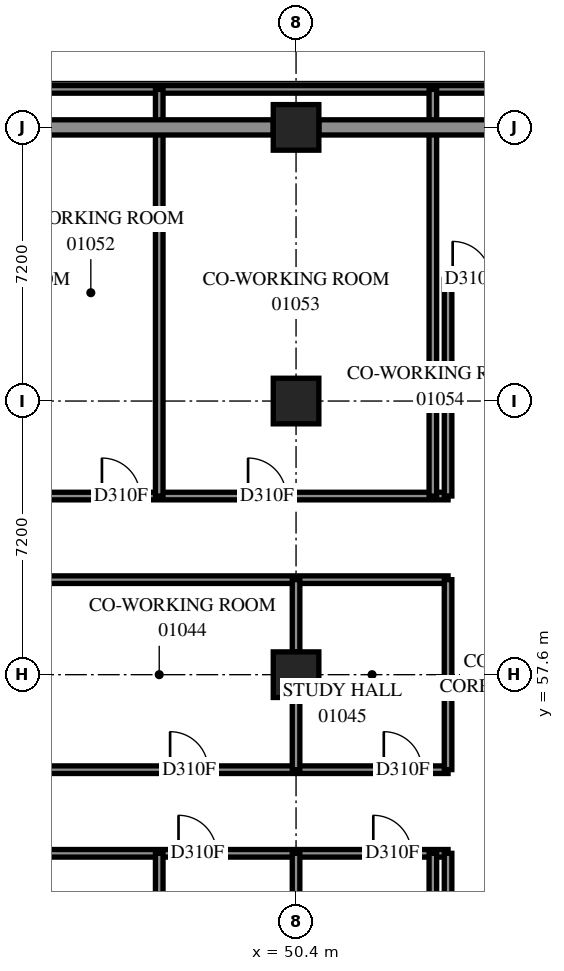
"""IFC4 building model, lengths in metres.
Left out: names, types, materials, properties, quantities, classifications, styles, units other than length and angle.
Written with IfcOpenShell. Run it as: python <this file> out.ifc"""

import sys

from ifc_helpers import new_model, si_unit, direction, frame, frame_2d, origin, origin_2d, place, context, subcontext, project, spatial, rectangle, extrude, element, fill, save


model = new_model("IFC4")
c1 = context("Model", 3, precision=1e-05, world=origin(), true_north=direction((0.0, 1.0)))
c2 = subcontext(c1, "Body", "Model", "MODEL_VIEW")
j1 = project(units=[si_unit("LENGTHUNIT", "METRE"), si_unit("PLANEANGLEUNIT", "RADIAN")], contexts=[c1])
p1 = place(None, origin())
s1 = spatial("IfcSite", under=j1, at=p1, CompositionType="ELEMENT")
p2 = place(p1, origin())
s2 = spatial("IfcBuilding", under=s1, at=p2, CompositionType="ELEMENT")
p3 = place(p2, frame((0.0, 0.0, 6.0)))
s3 = spatial("IfcBuildingStorey", under=s2, at=p3, CompositionType="ELEMENT", Elevation=6.0)
for number, where, z_axis, x_axis in (
    (1, (50.4, 57.6, 0.0), (0.0, 0.0, 1.0), (1.0, 0.0, 0.0)),
    (2, (50.4, 64.8, 0.0), (0.0, 0.0, 1.0), (1.0, 0.0, 0.0)),
    (3, (50.4, 72.0, 0.0), (0.0, 0.0, 1.0), (1.0, 0.0, 0.0)),
):
    element("IfcColumn", number, at=place(p3, frame(where, z_axis=z_axis, x_axis=x_axis)), inside=s3, PredefinedType="COLUMN", context=c2, shape_type="SweptSolid", body=[
        extrude(rectangle(XDim=1.2, YDim=1.2, at=origin_2d()), origin(), (0.0, 0.0, 1.0), 3.8),
    ])
p4 = place(p3, frame((6.0, 73.0, 0.0), z_axis=(0.0, 0.0, 1.0), x_axis=(1.0, 0.0, 0.0)))
e4 = element("IfcWall", 4, at=p4, inside=s3, PredefinedType="PARTITIONING", context=c2, shape_type="SweptSolid", body=[
    extrude(rectangle(XDim=73.2, YDim=0.2, at=frame_2d((36.6, 0.0))), origin(), (0.0, 0.0, 1.0), 3.8),
])
p5 = place(p3, frame((0.0, 55.1, 0.0), z_axis=(0.0, 0.0, 1.0), x_axis=(1.0, 0.0, 0.0)))
e5 = element("IfcWall", 5, at=p5, inside=s3, PredefinedType="PARTITIONING", context=c2, shape_type="SweptSolid", body=[
    extrude(rectangle(XDim=54.4, YDim=0.2, at=frame_2d((27.2, 0.0))), origin(), (0.0, 0.0, 1.0), 3.8),
])
p6 = place(p5, frame((10.485, 0.0, 0.0)))
e6 = element("IfcOpeningElement", 6, at=p6, cuts=e5, PredefinedType="OPENING", context=c2, shape_type="SweptSolid", body=[
    extrude(rectangle(XDim=1.0, YDim=2.1, at=frame_2d((0.5, 1.05))), frame((0.0, 0.11, 0.0), z_axis=(0.0, -1.0, 0.0), x_axis=(1.0, 0.0, 0.0)), (0.0, 0.0, 1.0), 0.22),
])
p7 = place(p5, frame((16.475, 0.0, 0.0)))
e7 = element("IfcOpeningElement", 7, at=p7, cuts=e5, PredefinedType="OPENING", context=c2, shape_type="SweptSolid", body=[
    extrude(rectangle(XDim=1.0, YDim=2.1, at=frame_2d((0.5, 1.05))), frame((0.0, 0.11, 0.0), z_axis=(0.0, -1.0, 0.0), x_axis=(1.0, 0.0, 0.0)), (0.0, 0.0, 1.0), 0.22),
])
p8 = place(p5, frame((22.025, 0.0, 0.0)))
e8 = element("IfcOpeningElement", 8, at=p8, cuts=e5, PredefinedType="OPENING", context=c2, shape_type="SweptSolid", body=[
    extrude(rectangle(XDim=1.0, YDim=2.1, at=frame_2d((0.5, 1.05))), frame((0.0, 0.11, 0.0), z_axis=(0.0, -1.0, 0.0), x_axis=(1.0, 0.0, 0.0)), (0.0, 0.0, 1.0), 0.22),
])
p9 = place(p5, frame((34.484, 0.0, 0.0)))
e9 = element("IfcOpeningElement", 9, at=p9, cuts=e5, PredefinedType="OPENING", context=c2, shape_type="SweptSolid", body=[
    extrude(rectangle(XDim=1.0, YDim=2.1, at=frame_2d((0.5, 1.05))), frame((0.0, 0.11, 0.0), z_axis=(0.0, -1.0, 0.0), x_axis=(1.0, 0.0, 0.0)), (0.0, 0.0, 1.0), 0.22),
])
p10 = place(p5, frame((40.125, 0.0, 0.0)))
e10 = element("IfcOpeningElement", 10, at=p10, cuts=e5, PredefinedType="OPENING", context=c2, shape_type="SweptSolid", body=[
    extrude(rectangle(XDim=1.0, YDim=2.1, at=frame_2d((0.5, 1.05))), frame((0.0, 0.11, 0.0), z_axis=(0.0, -1.0, 0.0), x_axis=(1.0, 0.0, 0.0)), (0.0, 0.0, 1.0), 0.22),
])
p11 = place(p5, frame((47.086, 0.0, 0.0)))
e11 = element("IfcOpeningElement", 11, at=p11, cuts=e5, PredefinedType="OPENING", context=c2, shape_type="SweptSolid", body=[
    extrude(rectangle(XDim=1.0, YDim=2.1, at=frame_2d((0.5, 1.05))), frame((0.0, 0.11, 0.0), z_axis=(0.0, -1.0, 0.0), x_axis=(1.0, 0.0, 0.0)), (0.0, 0.0, 1.0), 0.22),
])
p12 = place(p5, frame((52.709, 0.0, 0.0)))
e12 = element("IfcOpeningElement", 12, at=p12, cuts=e5, PredefinedType="OPENING", context=c2, shape_type="SweptSolid", body=[
    extrude(rectangle(XDim=1.0, YDim=2.1, at=frame_2d((0.5, 1.05))), frame((0.0, 0.11, 0.0), z_axis=(0.0, -1.0, 0.0), x_axis=(1.0, 0.0, 0.0)), (0.0, 0.0, 1.0), 0.22),
])
p13 = place(p5, frame((2.451, 0.0, 0.0)))
e13 = element("IfcOpeningElement", 13, at=p13, cuts=e5, PredefinedType="OPENING", context=c2, shape_type="SweptSolid", body=[
    extrude(rectangle(XDim=1.0, YDim=2.1, at=frame_2d((0.5, 1.05))), frame((0.0, 0.11, 0.0), z_axis=(0.0, -1.0, 0.0), x_axis=(1.0, 0.0, 0.0)), (0.0, 0.0, 1.0), 0.22),
])
p14 = place(p3, frame((0.0, 52.9, 0.0), z_axis=(0.0, 0.0, 1.0), x_axis=(1.0, 0.0, 0.0)))
e14 = element("IfcWall", 14, at=p14, inside=s3, PredefinedType="PARTITIONING", context=c2, shape_type="SweptSolid", body=[
    extrude(rectangle(XDim=54.4, YDim=0.2, at=frame_2d((27.2, 0.0))), origin(), (0.0, 0.0, 1.0), 3.8),
])
p15 = place(p14, frame((8.689, 0.0, 0.0)))
e15 = element("IfcOpeningElement", 15, at=p15, cuts=e14, PredefinedType="OPENING", context=c2, shape_type="SweptSolid", body=[
    extrude(rectangle(XDim=1.0, YDim=2.1, at=frame_2d((0.5, 1.05))), frame((0.0, 0.11, 0.0), z_axis=(0.0, -1.0, 0.0), x_axis=(1.0, 0.0, 0.0)), (0.0, 0.0, 1.0), 0.22),
])
p16 = place(p14, frame((11.325, 0.0, 0.0)))
e16 = element("IfcOpeningElement", 16, at=p16, cuts=e14, PredefinedType="OPENING", context=c2, shape_type="SweptSolid", body=[
    extrude(rectangle(XDim=1.0, YDim=2.1, at=frame_2d((0.5, 1.05))), frame((0.0, 0.11, 0.0), z_axis=(0.0, -1.0, 0.0), x_axis=(1.0, 0.0, 0.0)), (0.0, 0.0, 1.0), 0.22),
])
p17 = place(p14, frame((18.262, 0.0, 0.0)))
e17 = element("IfcOpeningElement", 17, at=p17, cuts=e14, PredefinedType="OPENING", context=c2, shape_type="SweptSolid", body=[
    extrude(rectangle(XDim=1.0, YDim=2.1, at=frame_2d((0.5, 1.05))), frame((0.0, 0.11, 0.0), z_axis=(0.0, -1.0, 0.0), x_axis=(1.0, 0.0, 0.0)), (0.0, 0.0, 1.0), 0.22),
])
p18 = place(p14, frame((23.633, 0.0, 0.0)))
e18 = element("IfcOpeningElement", 18, at=p18, cuts=e14, PredefinedType="OPENING", context=c2, shape_type="SweptSolid", body=[
    extrude(rectangle(XDim=1.0, YDim=2.1, at=frame_2d((0.5, 1.05))), frame((0.0, 0.11, 0.0), z_axis=(0.0, -1.0, 0.0), x_axis=(1.0, 0.0, 0.0)), (0.0, 0.0, 1.0), 0.22),
])
p19 = place(p14, frame((27.538, 0.0, 0.0)))
e19 = element("IfcOpeningElement", 19, at=p19, cuts=e14, PredefinedType="OPENING", context=c2, shape_type="SweptSolid", body=[
    extrude(rectangle(XDim=1.0, YDim=2.1, at=frame_2d((0.5, 1.05))), frame((0.0, 0.11, 0.0), z_axis=(0.0, -1.0, 0.0), x_axis=(1.0, 0.0, 0.0)), (0.0, 0.0, 1.0), 0.22),
])
p20 = place(p14, frame((32.907, 0.0, 0.0)))
e20 = element("IfcOpeningElement", 20, at=p20, cuts=e14, PredefinedType="OPENING", context=c2, shape_type="SweptSolid", body=[
    extrude(rectangle(XDim=1.0, YDim=2.1, at=frame_2d((0.5, 1.05))), frame((0.0, 0.11, 0.0), z_axis=(0.0, -1.0, 0.0), x_axis=(1.0, 0.0, 0.0)), (0.0, 0.0, 1.0), 0.22),
])
p21 = place(p14, frame((38.032, 0.0, 0.0)))
e21 = element("IfcOpeningElement", 21, at=p21, cuts=e14, PredefinedType="OPENING", context=c2, shape_type="SweptSolid", body=[
    extrude(rectangle(XDim=1.0, YDim=2.1, at=frame_2d((0.5, 1.05))), frame((0.0, 0.11, 0.0), z_axis=(0.0, -1.0, 0.0), x_axis=(1.0, 0.0, 0.0)), (0.0, 0.0, 1.0), 0.22),
])
p22 = place(p14, frame((41.938, 0.0, 0.0)))
e22 = element("IfcOpeningElement", 22, at=p22, cuts=e14, PredefinedType="OPENING", context=c2, shape_type="SweptSolid", body=[
    extrude(rectangle(XDim=1.0, YDim=2.1, at=frame_2d((0.5, 1.05))), frame((0.0, 0.11, 0.0), z_axis=(0.0, -1.0, 0.0), x_axis=(1.0, 0.0, 0.0)), (0.0, 0.0, 1.0), 0.22),
])
p23 = place(p14, frame((47.307, 0.0, 0.0)))
e23 = element("IfcOpeningElement", 23, at=p23, cuts=e14, PredefinedType="OPENING", context=c2, shape_type="SweptSolid", body=[
    extrude(rectangle(XDim=1.0, YDim=2.1, at=frame_2d((0.5, 1.05))), frame((0.0, 0.11, 0.0), z_axis=(0.0, -1.0, 0.0), x_axis=(1.0, 0.0, 0.0)), (0.0, 0.0, 1.0), 0.22),
])
p24 = place(p14, frame((52.432, 0.0, 0.0)))
e24 = element("IfcOpeningElement", 24, at=p24, cuts=e14, PredefinedType="OPENING", context=c2, shape_type="SweptSolid", body=[
    extrude(rectangle(XDim=1.0, YDim=2.1, at=frame_2d((0.5, 1.05))), frame((0.0, 0.11, 0.0), z_axis=(0.0, -1.0, 0.0), x_axis=(1.0, 0.0, 0.0)), (0.0, 0.0, 1.0), 0.22),
])
p25 = place(p14, frame((2.288, 0.0, 0.0)))
e25 = element("IfcOpeningElement", 25, at=p25, cuts=e14, PredefinedType="OPENING", context=c2, shape_type="SweptSolid", body=[
    extrude(rectangle(XDim=1.0, YDim=2.1, at=frame_2d((0.5, 1.05))), frame((0.0, 0.11, 0.0), z_axis=(0.0, -1.0, 0.0), x_axis=(1.0, 0.0, 0.0)), (0.0, 0.0, 1.0), 0.22),
])
p26 = place(p14, frame((4.772, 0.0, 0.0)))
e26 = element("IfcOpeningElement", 26, at=p26, cuts=e14, PredefinedType="OPENING", context=c2, shape_type="SweptSolid", body=[
    extrude(rectangle(XDim=1.0, YDim=2.1, at=frame_2d((0.5, 1.05))), frame((0.0, 0.11, 0.0), z_axis=(0.0, -1.0, 0.0), x_axis=(1.0, 0.0, 0.0)), (0.0, 0.0, 1.0), 0.22),
])
p27 = place(p3, frame((0.002, 60.1, 0.0), z_axis=(0.0, 0.0, 1.0), x_axis=(1.0, 0.0, 0.0)))
e27 = element("IfcWall", 27, at=p27, inside=s3, PredefinedType="PARTITIONING", context=c2, shape_type="SweptSolid", body=[
    extrude(rectangle(XDim=54.398, YDim=0.2, at=frame_2d((27.199, 0.0))), origin(), (0.0, 0.0, 1.0), 3.8),
])
p28 = place(p27, frame((3.729, 0.0, 0.0)))
e28 = element("IfcOpeningElement", 28, at=p28, cuts=e27, PredefinedType="OPENING", context=c2, shape_type="SweptSolid", body=[
    extrude(rectangle(XDim=1.0, YDim=2.1, at=frame_2d((0.5, 1.05))), frame((0.0, 0.11, 0.0), z_axis=(0.0, -1.0, 0.0), x_axis=(1.0, 0.0, 0.0)), (0.0, 0.0, 1.0), 0.22),
])
p29 = place(p3, frame((0.002, 62.3, 0.0), z_axis=(0.0, 0.0, 1.0), x_axis=(1.0, 0.0, 0.0)))
e29 = element("IfcWall", 29, at=p29, inside=s3, PredefinedType="PARTITIONING", context=c2, shape_type="SweptSolid", body=[
    extrude(rectangle(XDim=54.398, YDim=0.2, at=frame_2d((27.199, 0.0))), origin(), (0.0, 0.0, 1.0), 3.8),
])
p30 = place(p29, frame((8.667, 0.0, 0.0)))
e30 = element("IfcOpeningElement", 30, at=p30, cuts=e29, PredefinedType="OPENING", context=c2, shape_type="SweptSolid", body=[
    extrude(rectangle(XDim=1.0, YDim=2.1, at=frame_2d((0.5, 1.05))), frame((0.0, 0.11, 0.0), z_axis=(0.0, -1.0, 0.0), x_axis=(1.0, 0.0, 0.0)), (0.0, 0.0, 1.0), 0.22),
])
p31 = place(p29, frame((13.136, 0.0, 0.0)))
e31 = element("IfcOpeningElement", 31, at=p31, cuts=e29, PredefinedType="OPENING", context=c2, shape_type="SweptSolid", body=[
    extrude(rectangle(XDim=1.0, YDim=2.1, at=frame_2d((0.5, 1.05))), frame((0.0, 0.11, 0.0), z_axis=(0.0, -1.0, 0.0), x_axis=(1.0, 0.0, 0.0)), (0.0, 0.0, 1.0), 0.22),
])
p32 = place(p29, frame((18.566, 0.0, 0.0)))
e32 = element("IfcOpeningElement", 32, at=p32, cuts=e29, PredefinedType="OPENING", context=c2, shape_type="SweptSolid", body=[
    extrude(rectangle(XDim=1.0, YDim=2.1, at=frame_2d((0.5, 1.05))), frame((0.0, 0.11, 0.0), z_axis=(0.0, -1.0, 0.0), x_axis=(1.0, 0.0, 0.0)), (0.0, 0.0, 1.0), 0.22),
])
p33 = place(p29, frame((27.256, 0.0, 0.0)))
e33 = element("IfcOpeningElement", 33, at=p33, cuts=e29, PredefinedType="OPENING", context=c2, shape_type="SweptSolid", body=[
    extrude(rectangle(XDim=1.0, YDim=2.1, at=frame_2d((0.5, 1.05))), frame((0.0, 0.11, 0.0), z_axis=(0.0, -1.0, 0.0), x_axis=(1.0, 0.0, 0.0)), (0.0, 0.0, 1.0), 0.22),
])
p34 = place(p29, frame((34.736, 0.0, 0.0)))
e34 = element("IfcOpeningElement", 34, at=p34, cuts=e29, PredefinedType="OPENING", context=c2, shape_type="SweptSolid", body=[
    extrude(rectangle(XDim=1.0, YDim=2.1, at=frame_2d((0.5, 1.05))), frame((0.0, 0.11, 0.0), z_axis=(0.0, -1.0, 0.0), x_axis=(1.0, 0.0, 0.0)), (0.0, 0.0, 1.0), 0.22),
])
p35 = place(p29, frame((40.166, 0.0, 0.0)))
e35 = element("IfcOpeningElement", 35, at=p35, cuts=e29, PredefinedType="OPENING", context=c2, shape_type="SweptSolid", body=[
    extrude(rectangle(XDim=1.0, YDim=2.1, at=frame_2d((0.5, 1.05))), frame((0.0, 0.11, 0.0), z_axis=(0.0, -1.0, 0.0), x_axis=(1.0, 0.0, 0.0)), (0.0, 0.0, 1.0), 0.22),
])
p36 = place(p29, frame((45.291, 0.0, 0.0)))
e36 = element("IfcOpeningElement", 36, at=p36, cuts=e29, PredefinedType="OPENING", context=c2, shape_type="SweptSolid", body=[
    extrude(rectangle(XDim=1.0, YDim=2.1, at=frame_2d((0.5, 1.05))), frame((0.0, 0.11, 0.0), z_axis=(0.0, -1.0, 0.0), x_axis=(1.0, 0.0, 0.0)), (0.0, 0.0, 1.0), 0.22),
])
p37 = place(p29, frame((49.136, 0.0, 0.0)))
e37 = element("IfcOpeningElement", 37, at=p37, cuts=e29, PredefinedType="OPENING", context=c2, shape_type="SweptSolid", body=[
    extrude(rectangle(XDim=1.0, YDim=2.1, at=frame_2d((0.5, 1.05))), frame((0.0, 0.11, 0.0), z_axis=(0.0, -1.0, 0.0), x_axis=(1.0, 0.0, 0.0)), (0.0, 0.0, 1.0), 0.22),
])
p38 = place(p29, frame((4.807, 0.0, 0.0)))
e38 = element("IfcOpeningElement", 38, at=p38, cuts=e29, PredefinedType="OPENING", context=c2, shape_type="SweptSolid", body=[
    extrude(rectangle(XDim=1.0, YDim=2.1, at=frame_2d((0.5, 1.05))), frame((0.0, 0.11, 0.0), z_axis=(0.0, -1.0, 0.0), x_axis=(1.0, 0.0, 0.0)), (0.0, 0.0, 1.0), 0.22),
])
p39 = place(p3, frame((54.4, 68.0, 0.0), z_axis=(0.0, 0.0, 1.0), x_axis=(1.0, 0.0, 0.0)))
e39 = element("IfcWall", 39, at=p39, inside=s3, PredefinedType="PARTITIONING", context=c2, shape_type="SweptSolid", body=[
    extrude(rectangle(XDim=20.8, YDim=0.2, at=frame_2d((10.4, 0.0))), origin(), (0.0, 0.0, 1.0), 3.8),
])
p40 = place(p39, frame((0.121, 0.0, 0.0)))
e40 = element("IfcOpeningElement", 40, at=p40, cuts=e39, PredefinedType="OPENING", context=c2, shape_type="SweptSolid", body=[
    extrude(rectangle(XDim=1.0, YDim=2.1, at=frame_2d((0.5, 1.05))), frame((0.0, 0.11, 0.0), z_axis=(0.0, -1.0, 0.0), x_axis=(1.0, 0.0, 0.0)), (0.0, 0.0, 1.0), 0.22),
])
p41 = place(p39, frame((19.622, 0.0, 0.0)))
e41 = element("IfcOpeningElement", 41, at=p41, cuts=e39, PredefinedType="OPENING", context=c2, shape_type="SweptSolid", body=[
    extrude(rectangle(XDim=1.0, YDim=2.1, at=frame_2d((0.5, 1.05))), frame((0.0, 0.11, 0.0), z_axis=(0.0, -1.0, 0.0), x_axis=(1.0, 0.0, 0.0)), (0.0, 0.0, 1.0), 0.22),
])
p42 = place(p39, frame((8.858, 0.0, 0.0)))
e42 = element("IfcOpeningElement", 42, at=p42, cuts=e39, PredefinedType="OPENING", context=c2, shape_type="SweptSolid", body=[
    extrude(rectangle(XDim=1.0, YDim=2.1, at=frame_2d((0.5, 1.05))), frame((0.0, 0.11, 0.0), z_axis=(0.0, -1.0, 0.0), x_axis=(1.0, 0.0, 0.0)), (0.0, 0.0, 1.0), 0.22),
])
p43 = place(p39, frame((14.568, 0.0, 0.0)))
e43 = element("IfcOpeningElement", 43, at=p43, cuts=e39, PredefinedType="OPENING", context=c2, shape_type="SweptSolid", body=[
    extrude(rectangle(XDim=1.0, YDim=2.1, at=frame_2d((0.5, 1.05))), frame((0.0, 0.11, 0.0), z_axis=(0.0, -1.0, 0.0), x_axis=(1.0, 0.0, 0.0)), (0.0, 0.0, 1.0), 0.22),
])
for number, where, z_axis, x_axis in (
    (44, (46.8, 42.0, 0.0), (0.0, 0.0, 1.0), (0.0, 1.0, 0.0)),
    (45, (54.0, 42.0, 0.0), (0.0, 0.0, 1.0), (0.0, 1.0, 0.0)),
):
    element("IfcWall", number, at=place(p3, frame(where, z_axis=z_axis, x_axis=x_axis)), inside=s3, PredefinedType="PARTITIONING", context=c2, shape_type="SweptSolid", body=[
        extrude(rectangle(XDim=10.9, YDim=0.2, at=frame_2d((5.45, 0.0))), origin(), (0.0, 0.0, 1.0), 3.8),
    ])
for number, where, z_axis, x_axis in (
    (46, (46.8, 62.3, 0.0), (0.0, 0.0, 1.0), (0.0, 1.0, 0.0)),
    (47, (54.0, 62.3, 0.0), (0.0, 0.0, 1.0), (0.0, 1.0, 0.0)),
):
    element("IfcWall", number, at=place(p3, frame(where, z_axis=z_axis, x_axis=x_axis)), inside=s3, PredefinedType="PARTITIONING", context=c2, shape_type="SweptSolid", body=[
        extrude(rectangle(XDim=10.7, YDim=0.2, at=frame_2d((5.35, 0.0))), origin(), (0.0, 0.0, 1.0), 3.8),
    ])
p44 = place(p3, frame((54.4, 47.2, 0.0), z_axis=(0.0, 0.0, 1.0), x_axis=(0.0, 1.0, 0.0)))
e48 = element("IfcWall", 48, at=p44, inside=s3, PredefinedType="PARTITIONING", context=c2, shape_type="SweptSolid", body=[
    extrude(rectangle(XDim=5.7, YDim=0.2, at=frame_2d((2.85, 0.0))), origin(), (0.0, 0.0, 1.0), 3.8),
])
p45 = place(p3, frame((54.4, 62.302, 0.0), z_axis=(0.0, 0.0, 1.0), x_axis=(0.0, 1.0, 0.0)))
e49 = element("IfcWall", 49, at=p45, inside=s3, PredefinedType="PARTITIONING", context=c2, shape_type="SweptSolid", body=[
    extrude(rectangle(XDim=5.698, YDim=0.2, at=frame_2d((2.849, 0.0))), origin(), (0.0, 0.0, 1.0), 3.8),
])
p46 = place(p3, frame((54.4, 55.102, 0.0), z_axis=(0.0, 0.0, 1.0), x_axis=(0.0, 1.0, 0.0)))
e50 = element("IfcWall", 50, at=p46, inside=s3, PredefinedType="PARTITIONING", context=c2, shape_type="SweptSolid", body=[
    extrude(rectangle(XDim=4.998, YDim=0.2, at=frame_2d((2.499, 0.0))), origin(), (0.0, 0.0, 1.0), 3.8),
])
for number, where, z_axis, x_axis in (
    (51, (50.4, 51.0, 0.0), (0.0, 0.0, 1.0), (0.0, 1.0, 0.0)),
    (52, (50.4, 55.1, 0.0), (0.0, 0.0, 1.0), (0.0, 1.0, 0.0)),
    (53, (50.4, 58.2, 0.0), (0.0, 0.0, 1.0), (0.0, 1.0, 0.0)),
):
    element("IfcWall", number, at=place(p3, frame(where, z_axis=z_axis, x_axis=x_axis)), inside=s3, PredefinedType="PARTITIONING", context=c2, shape_type="SweptSolid", body=[
        extrude(rectangle(XDim=1.9, YDim=0.2, at=frame_2d((0.95, 0.0))), origin(), (0.0, 0.0, 1.0), 3.8),
    ])
p47 = place(p23, origin())
e54 = element("IfcDoor", 54, at=p47, inside=s3, OperationType="SINGLE_SWING_RIGHT", PredefinedType="DOOR", context=c2, shape_type="SweptSolid", body=[
    extrude(rectangle(XDim=1.0, YDim=2.1, at=frame_2d((0.5, 1.05))), frame((0.0, 0.025, 0.0), z_axis=(0.0, -1.0, 0.0), x_axis=(1.0, 0.0, 0.0)), (0.0, 0.0, 1.0), 0.05),
])
fill(e23, e54)
p48 = place(p24, origin())
e55 = element("IfcDoor", 55, at=p48, inside=s3, OperationType="SINGLE_SWING_LEFT", PredefinedType="DOOR", context=c2, shape_type="SweptSolid", body=[
    extrude(rectangle(XDim=1.0, YDim=2.1, at=frame_2d((0.5, 1.05))), frame((0.0, 0.025, 0.0), z_axis=(0.0, -1.0, 0.0), x_axis=(1.0, 0.0, 0.0)), (0.0, 0.0, 1.0), 0.05),
])
fill(e24, e55)
p49 = place(p11, origin())
e56 = element("IfcDoor", 56, at=p49, inside=s3, OperationType="SINGLE_SWING_RIGHT", PredefinedType="DOOR", context=c2, shape_type="SweptSolid", body=[
    extrude(rectangle(XDim=1.0, YDim=2.1, at=frame_2d((0.5, 1.05))), frame((0.0, 0.025, 0.0), z_axis=(0.0, -1.0, 0.0), x_axis=(1.0, 0.0, 0.0)), (0.0, 0.0, 1.0), 0.05),
])
fill(e11, e56)
p50 = place(p12, origin())
e57 = element("IfcDoor", 57, at=p50, inside=s3, OperationType="SINGLE_SWING_RIGHT", PredefinedType="DOOR", context=c2, shape_type="SweptSolid", body=[
    extrude(rectangle(XDim=1.0, YDim=2.1, at=frame_2d((0.5, 1.05))), frame((0.0, 0.025, 0.0), z_axis=(0.0, -1.0, 0.0), x_axis=(1.0, 0.0, 0.0)), (0.0, 0.0, 1.0), 0.05),
])
fill(e12, e57)
p51 = place(p36, origin())
e58 = element("IfcDoor", 58, at=p51, inside=s3, OperationType="SINGLE_SWING_RIGHT", PredefinedType="DOOR", context=c2, shape_type="SweptSolid", body=[
    extrude(rectangle(XDim=1.0, YDim=2.1, at=frame_2d((0.5, 1.05))), frame((0.0, 0.025, 0.0), z_axis=(0.0, -1.0, 0.0), x_axis=(1.0, 0.0, 0.0)), (0.0, 0.0, 1.0), 0.05),
])
fill(e36, e58)
p52 = place(p37, origin())
e59 = element("IfcDoor", 59, at=p52, inside=s3, OperationType="SINGLE_SWING_LEFT", PredefinedType="DOOR", context=c2, shape_type="SweptSolid", body=[
    extrude(rectangle(XDim=1.0, YDim=2.1, at=frame_2d((0.5, 1.05))), frame((0.0, 0.025, 0.0), z_axis=(0.0, -1.0, 0.0), x_axis=(1.0, 0.0, 0.0)), (0.0, 0.0, 1.0), 0.05),
])
fill(e37, e59)
p53 = place(p40, origin())
e60 = element("IfcDoor", 60, at=p53, inside=s3, OperationType="SINGLE_SWING_LEFT", PredefinedType="DOOR", context=c2, shape_type="SweptSolid", body=[
    extrude(rectangle(XDim=1.0, YDim=2.1, at=frame_2d((0.5, 1.05))), frame((0.0, 0.025, 0.0), z_axis=(0.0, -1.0, 0.0), x_axis=(1.0, 0.0, 0.0)), (0.0, 0.0, 1.0), 0.05),
])
fill(e40, e60)
save(model, sys.argv[1])
